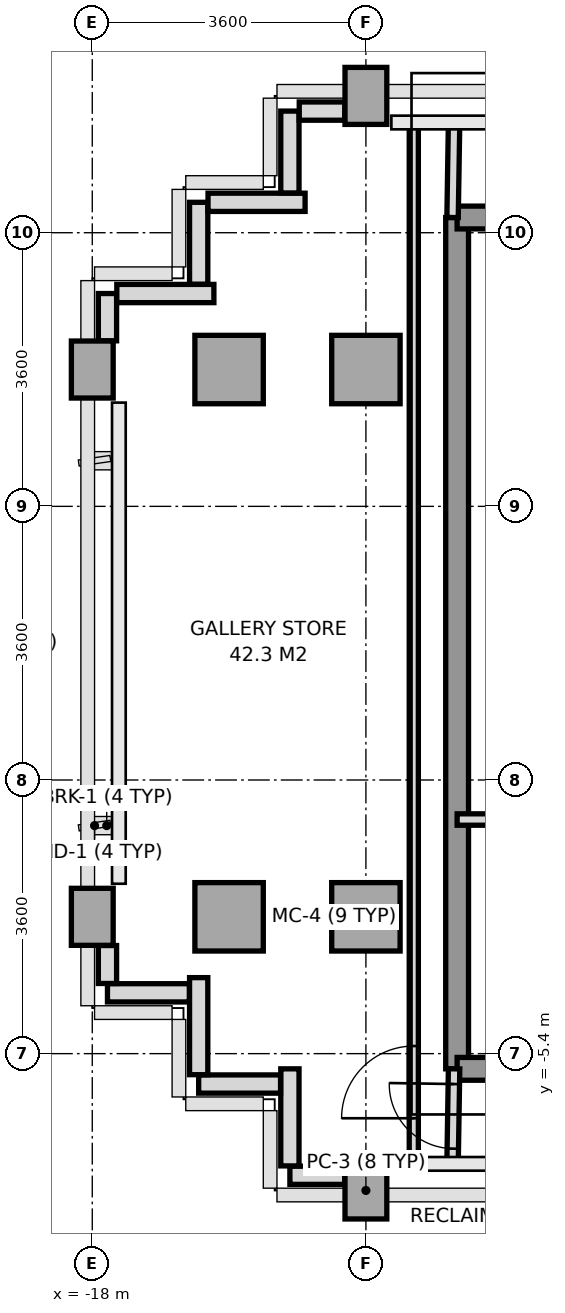
"""IFC4 building model, lengths in metres.
Left out: names, types, materials, properties, quantities, classifications, styles, units other than length and angle.
Written with IfcOpenShell. Run it as: python <this file> out.ifc"""

import sys

from ifc_helpers import new_model, si_unit, direction, frame, frame_2d, origin, origin_2d, place, context, subcontext, project, spatial, rectangle, extrude, source, transform, mapped, element, fill, save


model = new_model("IFC4")
c1 = context("Model", 3, precision=1e-05, world=origin(), true_north=direction((0.0, 1.0)))
c2 = subcontext(c1, "Body", "Model", "MODEL_VIEW")
j1 = project(units=[si_unit("LENGTHUNIT", "METRE"), si_unit("PLANEANGLEUNIT", "RADIAN")], contexts=[c1])
p1 = place(None, origin())
s1 = spatial("IfcSite", under=j1, at=p1, CompositionType="ELEMENT")
p2 = place(p1, origin())
s2 = spatial("IfcBuilding", under=s1, at=p2, CompositionType="ELEMENT")
p3 = place(p2, frame((0.0, 0.0, 219.4)))
s3 = spatial("IfcBuildingStorey", under=s2, at=p3, CompositionType="ELEMENT", Elevation=219.4)
m1 = source(origin(), c2, "Body", "SweptSolid", [
    extrude(rectangle(XDim=0.55, YDim=0.75, at=origin_2d()), origin(), (0.0, 0.0, 1.0), 4.01),
])
for number, where, z_axis, x_axis in (
    (1, (-18.0, -3.6, 0.0), (0.0, 0.0, 1.0), (1.0, 0.0, 0.0)),
    (2, (-18.0, 3.6, 0.0), (0.0, 0.0, 1.0), (1.0, 0.0, 0.0)),
):
    element("IfcColumn", number, at=place(p3, frame(where, z_axis=z_axis, x_axis=x_axis)), inside=s3, PredefinedType="COLUMN", context=c2, shape_type="MappedRepresentation", body=[
        mapped(m1, transform((0.0, 0.0, 0.0), x_axis=(1.0, 0.0, 0.0), y_axis=(0.0, 1.0, 0.0), z_axis=(0.0, 0.0, 1.0), scale=1.0)),
    ])
m2 = source(origin(), c2, "Body", "SweptSolid", [
    extrude(rectangle(XDim=0.9, YDim=0.9, at=origin_2d()), origin(), (0.0, 0.0, 1.0), 4.01),
])
for number, where, z_axis, x_axis in (
    (3, (-16.2, -3.6, 0.0), (0.0, 0.0, 1.0), (1.0, 0.0, 0.0)),
    (4, (-16.2, 3.6, 0.0), (0.0, 0.0, 1.0), (1.0, 0.0, 0.0)),
):
    element("IfcColumn", number, at=place(p3, frame(where, z_axis=z_axis, x_axis=x_axis)), inside=s3, PredefinedType="COLUMN", context=c2, shape_type="MappedRepresentation", body=[
        mapped(m2, transform((0.0, 0.0, 0.0), x_axis=(1.0, 0.0, 0.0), y_axis=(0.0, 1.0, 0.0), z_axis=(0.0, 0.0, 1.0), scale=1.0)),
    ])
p4 = place(p3, frame((-14.4, -7.2, 0.0), z_axis=(0.0, 0.0, 1.0), x_axis=(1.0, 0.0, 0.0)))
e5 = element("IfcColumn", 5, at=p4, inside=s3, PredefinedType="COLUMN", context=c2, shape_type="MappedRepresentation", body=[
    mapped(m1, transform((0.0, 0.0, 0.0), x_axis=(1.0, 0.0, 0.0), y_axis=(0.0, 1.0, 0.0), z_axis=(0.0, 0.0, 1.0), scale=1.0)),
])
for number, where, z_axis, x_axis in (
    (6, (-14.4, -3.6, 0.0), (0.0, 0.0, 1.0), (1.0, 0.0, 0.0)),
    (7, (-14.4, 3.6, 0.0), (0.0, 0.0, 1.0), (1.0, 0.0, 0.0)),
):
    element("IfcColumn", number, at=place(p3, frame(where, z_axis=z_axis, x_axis=x_axis)), inside=s3, PredefinedType="COLUMN", context=c2, shape_type="MappedRepresentation", body=[
        mapped(m2, transform((0.0, 0.0, 0.0), x_axis=(1.0, 0.0, 0.0), y_axis=(0.0, 1.0, 0.0), z_axis=(0.0, 0.0, 1.0), scale=1.0)),
    ])
p5 = place(p3, frame((-14.4, 7.2, 0.0), z_axis=(0.0, 0.0, 1.0), x_axis=(1.0, 0.0, 0.0)))
e8 = element("IfcColumn", 8, at=p5, inside=s3, PredefinedType="COLUMN", context=c2, shape_type="MappedRepresentation", body=[
    mapped(m1, transform((0.0, 0.0, 0.0), x_axis=(1.0, 0.0, 0.0), y_axis=(0.0, 1.0, 0.0), z_axis=(0.0, 0.0, 1.0), scale=1.0)),
])
p6 = place(p3, frame((-14.678, -7.0, 0.0), z_axis=(0.0, 0.0, 1.0), x_axis=(-1.0, 0.0, 0.0)))
e9 = element("IfcWall", 9, at=p6, inside=s3, PredefinedType="PARAPET", context=c2, shape_type="SweptSolid", body=[
    extrude(rectangle(XDim=0.722, YDim=0.24, at=frame_2d((0.361, 0.0))), origin(), (0.0, 0.0, 1.0), 1.15),
])
p7 = place(p3, frame((-15.4, -6.877, 0.0), z_axis=(0.0, 0.0, 1.0), x_axis=(0.0, 1.0, 0.0)))
e10 = element("IfcWall", 10, at=p7, inside=s3, PredefinedType="PARAPET", context=c2, shape_type="SweptSolid", body=[
    extrude(rectangle(XDim=1.277, YDim=0.24, at=frame_2d((0.638, 0.0))), origin(), (0.0, 0.0, 1.0), 1.15),
])
p8 = place(p3, frame((-15.523, -5.8, 0.0), z_axis=(0.0, 0.0, 1.0), x_axis=(-1.0, 0.0, 0.0)))
e11 = element("IfcWall", 11, at=p8, inside=s3, PredefinedType="PARAPET", context=c2, shape_type="SweptSolid", body=[
    extrude(rectangle(XDim=1.077, YDim=0.24, at=frame_2d((0.539, 0.0))), origin(), (0.0, 0.0, 1.0), 1.15),
])
p9 = place(p3, frame((-16.6, -5.677, 0.0), z_axis=(0.0, 0.0, 1.0), x_axis=(0.0, 1.0, 0.0)))
e12 = element("IfcWall", 12, at=p9, inside=s3, PredefinedType="PARAPET", context=c2, shape_type="SweptSolid", body=[
    extrude(rectangle(XDim=1.277, YDim=0.24, at=frame_2d((0.639, 0.0))), origin(), (0.0, 0.0, 1.0), 1.15),
])
p10 = place(p3, frame((-16.723, -4.6, 0.0), z_axis=(0.0, 0.0, 1.0), x_axis=(-1.0, 0.0, 0.0)))
e13 = element("IfcWall", 13, at=p10, inside=s3, PredefinedType="PARAPET", context=c2, shape_type="SweptSolid", body=[
    extrude(rectangle(XDim=1.077, YDim=0.24, at=frame_2d((0.539, 0.0))), origin(), (0.0, 0.0, 1.0), 1.15),
])
p11 = place(p3, frame((-17.8, -4.477, 0.0), z_axis=(0.0, 0.0, 1.0), x_axis=(0.0, 1.0, 0.0)))
e14 = element("IfcWall", 14, at=p11, inside=s3, PredefinedType="PARAPET", context=c2, shape_type="SweptSolid", body=[
    extrude(rectangle(XDim=0.499, YDim=0.24, at=frame_2d((0.25, 0.0))), origin(), (0.0, 0.0, 1.0), 1.15),
])
p12 = place(p3, frame((-17.8, 3.978, 0.0), z_axis=(0.0, 0.0, 1.0), x_axis=(0.0, 1.0, 0.0)))
e15 = element("IfcWall", 15, at=p12, inside=s3, PredefinedType="PARAPET", context=c2, shape_type="SweptSolid", body=[
    extrude(rectangle(XDim=0.622, YDim=0.24, at=frame_2d((0.311, 0.0))), origin(), (0.0, 0.0, 1.0), 1.15),
])
p13 = place(p3, frame((-17.677, 4.6, 0.0), z_axis=(0.0, 0.0, 1.0), x_axis=(1.0, 0.0, 0.0)))
e16 = element("IfcWall", 16, at=p13, inside=s3, PredefinedType="PARAPET", context=c2, shape_type="SweptSolid", body=[
    extrude(rectangle(XDim=1.277, YDim=0.24, at=frame_2d((0.639, 0.0))), origin(), (0.0, 0.0, 1.0), 1.15),
])
p14 = place(p3, frame((-16.6, 4.723, 0.0), z_axis=(0.0, 0.0, 1.0), x_axis=(0.0, 1.0, 0.0)))
e17 = element("IfcWall", 17, at=p14, inside=s3, PredefinedType="PARAPET", context=c2, shape_type="SweptSolid", body=[
    extrude(rectangle(XDim=1.077, YDim=0.24, at=frame_2d((0.539, 0.0))), origin(), (0.0, 0.0, 1.0), 1.15),
])
p15 = place(p3, frame((-16.477, 5.8, 0.0), z_axis=(0.0, 0.0, 1.0), x_axis=(1.0, 0.0, 0.0)))
e18 = element("IfcWall", 18, at=p15, inside=s3, PredefinedType="PARAPET", context=c2, shape_type="SweptSolid", body=[
    extrude(rectangle(XDim=1.277, YDim=0.24, at=frame_2d((0.639, 0.0))), origin(), (0.0, 0.0, 1.0), 1.15),
])
p16 = place(p3, frame((-15.4, 5.923, 0.0), z_axis=(0.0, 0.0, 1.0), x_axis=(0.0, 1.0, 0.0)))
e19 = element("IfcWall", 19, at=p16, inside=s3, PredefinedType="PARAPET", context=c2, shape_type="SweptSolid", body=[
    extrude(rectangle(XDim=1.077, YDim=0.24, at=frame_2d((0.539, 0.0))), origin(), (0.0, 0.0, 1.0), 1.15),
])
p17 = place(p3, frame((-15.277, 7.0, 0.0), z_axis=(0.0, 0.0, 1.0), x_axis=(1.0, 0.0, 0.0)))
e20 = element("IfcWall", 20, at=p17, inside=s3, PredefinedType="PARAPET", context=c2, shape_type="SweptSolid", body=[
    extrude(rectangle(XDim=0.599, YDim=0.24, at=frame_2d((0.3, 0.0))), origin(), (0.0, 0.0, 1.0), 1.15),
])
p18 = place(p3, frame((-13.2, -5.6, 0.0), z_axis=(0.0, 0.0, 1.0), x_axis=(0.0, 1.0, 0.0)))
e21 = element("IfcWall", 21, at=p18, inside=s3, PredefinedType="SHEAR", context=c2, shape_type="SweptSolid", body=[
    extrude(rectangle(XDim=11.2, YDim=0.3, at=frame_2d((5.6, 0.0))), origin(), (0.0, 0.0, 1.0), 4.01),
])
p19 = place(p3, frame((-13.2, 5.6, 0.0), z_axis=(0.0, 0.0, 1.0), x_axis=(1.0, 0.0, 0.0)))
e22 = element("IfcWall", 22, at=p19, inside=s3, PredefinedType="SHEAR", context=c2, shape_type="SweptSolid", body=[
    extrude(rectangle(XDim=1.844, YDim=0.3, at=frame_2d((0.922, 0.0))), origin(), (0.0, 0.0, 1.0), 4.01),
])
p20 = place(p3, frame((-13.2, -5.6, 0.0), z_axis=(0.0, 0.0, 1.0), x_axis=(1.0, 0.0, 0.0)))
e23 = element("IfcWall", 23, at=p20, inside=s3, PredefinedType="SHEAR", context=c2, shape_type="SweptSolid", body=[
    extrude(rectangle(XDim=7.8, YDim=0.3, at=frame_2d((3.9, 0.0))), origin(), (0.0, 0.0, 1.0), 4.01),
])
p21 = place(p20, frame((0.65, 0.0, 0.0)))
e24 = element("IfcOpeningElement", 24, at=p21, cuts=e23, PredefinedType="OPENING", context=c2, shape_type="SweptSolid", body=[
    extrude(rectangle(XDim=0.8, YDim=2.1, at=frame_2d((0.4, 1.05))), frame((0.0, 0.16, 0.0), z_axis=(0.0, -1.0, 0.0), x_axis=(1.0, 0.0, 0.0)), (0.0, 0.0, 1.0), 0.32),
])
p22 = place(p20, frame((3.4, 0.0, 0.0)))
e25 = element("IfcOpeningElement", 25, at=p22, cuts=e23, PredefinedType="OPENING", context=c2, shape_type="SweptSolid", body=[
    extrude(rectangle(XDim=0.95, YDim=2.15, at=frame_2d((0.475, 1.075))), frame((0.0, 0.16, 0.0), z_axis=(0.0, -1.0, 0.0), x_axis=(1.0, 0.0, 0.0)), (0.0, 0.0, 1.0), 0.32),
])
p23 = place(p20, frame((5.8, 0.0, 0.0)))
e26 = element("IfcOpeningElement", 26, at=p23, cuts=e23, PredefinedType="OPENING", context=c2, shape_type="SweptSolid", body=[
    extrude(rectangle(XDim=0.95, YDim=2.15, at=frame_2d((0.475, 1.075))), frame((0.0, 0.16, 0.0), z_axis=(0.0, -1.0, 0.0), x_axis=(1.0, 0.0, 0.0)), (0.0, 0.0, 1.0), 0.32),
])
p24 = place(p3, frame((-13.2, -2.32, 0.0), z_axis=(0.0, 0.0, 1.0), x_axis=(1.0, 0.0, 0.0)))
e27 = element("IfcWall", 27, at=p24, inside=s3, PredefinedType="PARTITIONING", context=c2, shape_type="SweptSolid", body=[
    extrude(rectangle(XDim=2.18, YDim=0.15, at=frame_2d((1.09, 0.0))), origin(), (0.0, 0.0, 1.0), 4.01),
])
p25 = place(p3, frame((-13.26, 5.6, 0.0), z_axis=(0.0, 0.0, 1.0), x_axis=(0.016013571389, 0.999871774545, 0.0)))
e28 = element("IfcWall", 28, at=p25, inside=s3, PredefinedType="PARTITIONING", context=c2, shape_type="SweptSolid", body=[
    extrude(rectangle(XDim=1.25, YDim=0.15, at=frame_2d((0.625, 0.0))), origin(), (0.0, 0.0, 1.0), 4.01),
])
p26 = place(p3, frame((-13.26, -6.85, 0.0), z_axis=(0.0, 0.0, 1.0), x_axis=(0.016013571389, 0.999871774545, 0.0)))
e29 = element("IfcWall", 29, at=p26, inside=s3, PredefinedType="PARTITIONING", context=c2, shape_type="SweptSolid", body=[
    extrude(rectangle(XDim=1.25, YDim=0.15, at=frame_2d((0.625, 0.0))), origin(), (0.0, 0.0, 1.0), 4.01),
])
p27 = place(p26, frame((0.2, 0.0, 0.0)))
e30 = element("IfcOpeningElement", 30, at=p27, cuts=e29, PredefinedType="OPENING", context=c2, shape_type="SweptSolid", body=[
    extrude(rectangle(XDim=0.85, YDim=2.1, at=frame_2d((0.425, 1.05))), frame((0.0, 0.085, 0.0), z_axis=(0.0, -1.0, 0.0), x_axis=(1.0, 0.0, 0.0)), (0.0, 0.0, 1.0), 0.17),
])
p28 = place(p3, frame((-13.77, -6.85, 0.0), z_axis=(0.0, 0.0, 1.0), x_axis=(0.0, 1.0, 0.0)))
e31 = element("IfcWall", 31, at=p28, inside=s3, PredefinedType="PARTITIONING", context=c2, shape_type="SweptSolid", body=[
    extrude(rectangle(XDim=13.7, YDim=0.12, at=frame_2d((6.85, 0.0))), origin(), (0.0, 0.0, 1.0), 3.71),
])
p29 = place(p28, frame((0.6, 0.0, 0.0)))
e32 = element("IfcOpeningElement", 32, at=p29, cuts=e31, PredefinedType="OPENING", context=c2, shape_type="SweptSolid", body=[
    extrude(rectangle(XDim=0.95, YDim=2.15, at=frame_2d((0.475, 1.075))), frame((0.0, 0.07, 0.0), z_axis=(0.0, -1.0, 0.0), x_axis=(1.0, 0.0, 0.0)), (0.0, 0.0, 1.0), 0.14),
])
m3 = source(origin(), c2, "Body", "SweptSolid", [
    extrude(rectangle(XDim=0.95, YDim=2.15, at=frame_2d((0.475, 1.075))), frame((0.0, 0.025, 0.0), z_axis=(0.0, -1.0, 0.0), x_axis=(1.0, 0.0, 0.0)), (0.0, 0.0, 1.0), 0.05),
])
p30 = place(p29, origin())
e33 = element("IfcDoor", 33, at=p30, inside=s3, OperationType="SINGLE_SWING_LEFT", PredefinedType="DOOR", context=c2, shape_type="MappedRepresentation", body=[
    mapped(m3, transform((0.0, 0.0, 0.0), x_axis=(1.0, 0.0, 0.0), y_axis=(0.0, 1.0, 0.0), z_axis=(0.0, 0.0, 1.0), scale=1.0)),
])
fill(e32, e33)
m4 = source(origin(), c2, "Body", "SweptSolid", [
    extrude(rectangle(XDim=0.85, YDim=2.1, at=frame_2d((0.425, 1.05))), frame((0.0, 0.025, 0.0), z_axis=(0.0, -1.0, 0.0), x_axis=(1.0, 0.0, 0.0)), (0.0, 0.0, 1.0), 0.05),
])
p31 = place(p27, origin())
e34 = element("IfcDoor", 34, at=p31, inside=s3, OperationType="SINGLE_SWING_RIGHT", PredefinedType="DOOR", context=c2, shape_type="MappedRepresentation", body=[
    mapped(m4, transform((0.0, 0.0, 0.0), x_axis=(1.0, 0.0, 0.0), y_axis=(0.0, 1.0, 0.0), z_axis=(0.0, 0.0, 1.0), scale=1.0)),
])
fill(e30, e34)
save(model, sys.argv[1])
